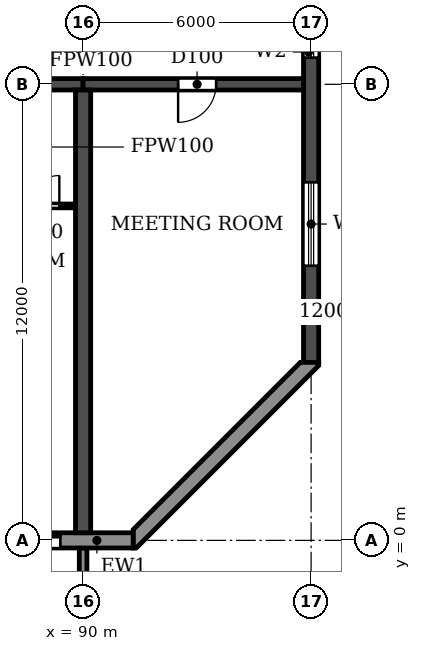
"""IFC4 building model, lengths in metres.
Left out: names, types, materials, properties, quantities, classifications, styles, units other than length and angle.
Written with IfcOpenShell. Run it as: python <this file> out.ifc"""

import sys

from ifc_helpers import new_model, si_unit, direction, frame, frame_2d, origin, place, context, subcontext, project, spatial, polyline, rectangle, outline, extrude, source, transform, mapped, element, fill, save


model = new_model("IFC4")
c1 = context("Model", 3, precision=1e-05, world=origin(), true_north=direction((0.0, 1.0)))
c2 = subcontext(c1, "Body", "Model", "MODEL_VIEW")
j1 = project(units=[si_unit("LENGTHUNIT", "METRE"), si_unit("PLANEANGLEUNIT", "RADIAN")], contexts=[c1])
p1 = place(None, origin())
s1 = spatial("IfcSite", under=j1, at=p1, CompositionType="ELEMENT")
p2 = place(p1, origin())
s2 = spatial("IfcBuilding", under=s1, at=p2, CompositionType="ELEMENT")
p3 = place(p2, frame((0.0, 0.0, 56.4)))
s3 = spatial("IfcBuildingStorey", under=s2, at=p3, CompositionType="ELEMENT", Elevation=56.4)
p4 = place(p3, frame((90.0, 0.2, 0.0), z_axis=(0.0, 0.0, 1.0), x_axis=(0.0, 1.0, 0.0)))
e1 = element("IfcWall", 1, at=p4, inside=s3, PredefinedType="SHEAR", context=c2, shape_type="SweptSolid", body=[
    extrude(rectangle(XDim=11.65, YDim=0.4, at=frame_2d((5.825, 0.0))), origin(), (0.0, 0.0, 1.0), 3.05),
])
p5 = place(p3, frame((96.0, 4.683, 0.0), z_axis=(0.0, 0.0, 1.0), x_axis=(0.0, 1.0, 0.0)))
e2 = element("IfcWall", 2, at=p5, inside=s3, PredefinedType="SHEAR", context=c2, shape_type="SweptSolid", body=[
    extrude(rectangle(XDim=35.434, YDim=0.4, at=frame_2d((17.717, 0.0))), origin(), (0.0, 0.0, 1.0), 3.05),
])
p6 = place(p5, frame((15.917, 0.0, 0.9)))
e3 = element("IfcOpeningElement", 3, at=p6, cuts=e2, PredefinedType="OPENING", context=c2, shape_type="SweptSolid", body=[
    extrude(rectangle(XDim=1.2, YDim=1.5, at=frame_2d((0.6, 0.75))), frame((0.0, 0.21, 0.0), z_axis=(0.0, -1.0, 0.0), x_axis=(1.0, 0.0, 0.0)), (0.0, 0.0, 1.0), 0.42),
])
p7 = place(p5, frame((23.817, 0.0, 0.9)))
e4 = element("IfcOpeningElement", 4, at=p7, cuts=e2, PredefinedType="OPENING", context=c2, shape_type="SweptSolid", body=[
    extrude(rectangle(XDim=1.2, YDim=1.5, at=frame_2d((0.6, 0.75))), frame((0.0, 0.21, 0.0), z_axis=(0.0, -1.0, 0.0), x_axis=(1.0, 0.0, 0.0)), (0.0, 0.0, 1.0), 0.42),
])
p8 = place(p5, frame((8.017, 0.0, 0.9)))
e5 = element("IfcOpeningElement", 5, at=p8, cuts=e2, PredefinedType="OPENING", context=c2, shape_type="SweptSolid", body=[
    extrude(rectangle(XDim=1.2, YDim=1.5, at=frame_2d((0.6, 0.75))), frame((0.0, 0.21, 0.0), z_axis=(0.0, -1.0, 0.0), x_axis=(1.0, 0.0, 0.0)), (0.0, 0.0, 1.0), 0.42),
])
p9 = place(p5, frame((29.493, 0.0, 0.6)))
e6 = element("IfcOpeningElement", 6, at=p9, cuts=e2, PredefinedType="OPENING", context=c2, shape_type="SweptSolid", body=[
    extrude(rectangle(XDim=2.2, YDim=1.8, at=frame_2d((1.1, 0.9))), frame((0.0, 0.21, 0.0), z_axis=(0.0, -1.0, 0.0), x_axis=(1.0, 0.0, 0.0)), (0.0, 0.0, 1.0), 0.42),
])
p10 = place(p5, frame((2.541, 0.0, 0.6)))
e7 = element("IfcOpeningElement", 7, at=p10, cuts=e2, PredefinedType="OPENING", context=c2, shape_type="SweptSolid", body=[
    extrude(rectangle(XDim=2.2, YDim=1.8, at=frame_2d((1.1, 0.9))), frame((0.0, 0.21, 0.0), z_axis=(0.0, -1.0, 0.0), x_axis=(1.0, 0.0, 0.0)), (0.0, 0.0, 1.0), 0.42),
])
p11 = place(p3, frame((84.0, 12.0, 0.0), z_axis=(0.0, 0.0, 1.0), x_axis=(1.0, 0.0, 0.0)))
e8 = element("IfcWall", 8, at=p11, inside=s3, PredefinedType="SHEAR", context=c2, shape_type="SweptSolid", body=[
    extrude(rectangle(XDim=6.0, YDim=0.3, at=frame_2d((3.0, 0.0))), origin(), (0.0, 0.0, 1.0), 2.45),
])
p12 = place(p11, frame((2.55, 0.0, 0.0)))
e9 = element("IfcOpeningElement", 9, at=p12, cuts=e8, PredefinedType="OPENING", context=c2, shape_type="SweptSolid", body=[
    extrude(rectangle(XDim=1.0, YDim=2.1, at=frame_2d((0.5, 1.05))), frame((0.0, 0.16, 0.0), z_axis=(0.0, -1.0, 0.0), x_axis=(1.0, 0.0, 0.0)), (0.0, 0.0, 1.0), 0.32),
])
p13 = place(p3, frame((90.0, 12.0, 0.0), z_axis=(0.0, 0.0, 1.0), x_axis=(1.0, 0.0, 0.0)))
e10 = element("IfcWall", 10, at=p13, inside=s3, PredefinedType="SHEAR", context=c2, shape_type="SweptSolid", body=[
    extrude(rectangle(XDim=5.8, YDim=0.3, at=frame_2d((2.9, 0.0))), origin(), (0.0, 0.0, 1.0), 2.45),
])
p14 = place(p13, frame((2.5, 0.0, 0.0)))
e11 = element("IfcOpeningElement", 11, at=p14, cuts=e10, PredefinedType="OPENING", context=c2, shape_type="SweptSolid", body=[
    extrude(rectangle(XDim=1.0, YDim=2.1, at=frame_2d((0.5, 1.05))), frame((0.0, 0.16, 0.0), z_axis=(0.0, -1.0, 0.0), x_axis=(1.0, 0.0, 0.0)), (0.0, 0.0, 1.0), 0.32),
])
p15 = place(p3, frame((10.683, 0.0, 0.0), z_axis=(0.0, 0.0, 1.0), x_axis=(1.0, 0.0, 0.0)))
e12 = element("IfcWall", 12, at=p15, inside=s3, PredefinedType="STANDARD", context=c2, shape_type="SweptSolid", body=[
    extrude(rectangle(XDim=80.634, YDim=0.4, at=frame_2d((40.317, 0.0))), origin(), (0.0, 0.0, 1.0), 3.05),
])
p16 = place(p15, frame((1.717, 0.0, 0.9)))
e13 = element("IfcOpeningElement", 13, at=p16, cuts=e12, PredefinedType="OPENING", context=c2, shape_type="SweptSolid", body=[
    extrude(rectangle(XDim=2.2, YDim=1.5, at=frame_2d((1.1, 0.75))), frame((0.0, 0.21, 0.0), z_axis=(0.0, -1.0, 0.0), x_axis=(1.0, 0.0, 0.0)), (0.0, 0.0, 1.0), 0.42),
])
p17 = place(p15, frame((4.917, 0.0, 0.0)))
e14 = element("IfcOpeningElement", 14, at=p17, cuts=e12, PredefinedType="OPENING", context=c2, shape_type="SweptSolid", body=[
    extrude(rectangle(XDim=1.8, YDim=2.4, at=frame_2d((0.9, 1.2))), frame((0.0, 0.21, 0.0), z_axis=(0.0, -1.0, 0.0), x_axis=(1.0, 0.0, 0.0)), (0.0, 0.0, 1.0), 0.42),
])
p18 = place(p15, frame((7.717, 0.0, 0.9)))
e15 = element("IfcOpeningElement", 15, at=p18, cuts=e12, PredefinedType="OPENING", context=c2, shape_type="SweptSolid", body=[
    extrude(rectangle(XDim=2.2, YDim=1.5, at=frame_2d((1.1, 0.75))), frame((0.0, 0.21, 0.0), z_axis=(0.0, -1.0, 0.0), x_axis=(1.0, 0.0, 0.0)), (0.0, 0.0, 1.0), 0.42),
])
p19 = place(p15, frame((10.717, 0.0, 0.9)))
e16 = element("IfcOpeningElement", 16, at=p19, cuts=e12, PredefinedType="OPENING", context=c2, shape_type="SweptSolid", body=[
    extrude(rectangle(XDim=2.2, YDim=1.5, at=frame_2d((1.1, 0.75))), frame((0.0, 0.21, 0.0), z_axis=(0.0, -1.0, 0.0), x_axis=(1.0, 0.0, 0.0)), (0.0, 0.0, 1.0), 0.42),
])
p20 = place(p15, frame((13.717, 0.0, 0.9)))
e17 = element("IfcOpeningElement", 17, at=p20, cuts=e12, PredefinedType="OPENING", context=c2, shape_type="SweptSolid", body=[
    extrude(rectangle(XDim=2.2, YDim=1.5, at=frame_2d((1.1, 0.75))), frame((0.0, 0.21, 0.0), z_axis=(0.0, -1.0, 0.0), x_axis=(1.0, 0.0, 0.0)), (0.0, 0.0, 1.0), 0.42),
])
p21 = place(p15, frame((16.917, 0.0, 0.0)))
e18 = element("IfcOpeningElement", 18, at=p21, cuts=e12, PredefinedType="OPENING", context=c2, shape_type="SweptSolid", body=[
    extrude(rectangle(XDim=1.8, YDim=2.4, at=frame_2d((0.9, 1.2))), frame((0.0, 0.21, 0.0), z_axis=(0.0, -1.0, 0.0), x_axis=(1.0, 0.0, 0.0)), (0.0, 0.0, 1.0), 0.42),
])
p22 = place(p15, frame((19.717, 0.0, 0.9)))
e19 = element("IfcOpeningElement", 19, at=p22, cuts=e12, PredefinedType="OPENING", context=c2, shape_type="SweptSolid", body=[
    extrude(rectangle(XDim=2.2, YDim=1.5, at=frame_2d((1.1, 0.75))), frame((0.0, 0.21, 0.0), z_axis=(0.0, -1.0, 0.0), x_axis=(1.0, 0.0, 0.0)), (0.0, 0.0, 1.0), 0.42),
])
p23 = place(p15, frame((22.717, 0.0, 0.9)))
e20 = element("IfcOpeningElement", 20, at=p23, cuts=e12, PredefinedType="OPENING", context=c2, shape_type="SweptSolid", body=[
    extrude(rectangle(XDim=2.2, YDim=1.5, at=frame_2d((1.1, 0.75))), frame((0.0, 0.21, 0.0), z_axis=(0.0, -1.0, 0.0), x_axis=(1.0, 0.0, 0.0)), (0.0, 0.0, 1.0), 0.42),
])
p24 = place(p15, frame((25.917, 0.0, 0.0)))
e21 = element("IfcOpeningElement", 21, at=p24, cuts=e12, PredefinedType="OPENING", context=c2, shape_type="SweptSolid", body=[
    extrude(rectangle(XDim=1.8, YDim=2.4, at=frame_2d((0.9, 1.2))), frame((0.0, 0.21, 0.0), z_axis=(0.0, -1.0, 0.0), x_axis=(1.0, 0.0, 0.0)), (0.0, 0.0, 1.0), 0.42),
])
p25 = place(p15, frame((28.717, 0.0, 0.9)))
e22 = element("IfcOpeningElement", 22, at=p25, cuts=e12, PredefinedType="OPENING", context=c2, shape_type="SweptSolid", body=[
    extrude(rectangle(XDim=2.2, YDim=1.5, at=frame_2d((1.1, 0.75))), frame((0.0, 0.21, 0.0), z_axis=(0.0, -1.0, 0.0), x_axis=(1.0, 0.0, 0.0)), (0.0, 0.0, 1.0), 0.42),
])
p26 = place(p15, frame((31.717, 0.0, 0.9)))
e23 = element("IfcOpeningElement", 23, at=p26, cuts=e12, PredefinedType="OPENING", context=c2, shape_type="SweptSolid", body=[
    extrude(rectangle(XDim=2.2, YDim=1.5, at=frame_2d((1.1, 0.75))), frame((0.0, 0.21, 0.0), z_axis=(0.0, -1.0, 0.0), x_axis=(1.0, 0.0, 0.0)), (0.0, 0.0, 1.0), 0.42),
])
p27 = place(p15, frame((34.717, 0.0, 0.9)))
e24 = element("IfcOpeningElement", 24, at=p27, cuts=e12, PredefinedType="OPENING", context=c2, shape_type="SweptSolid", body=[
    extrude(rectangle(XDim=2.2, YDim=1.5, at=frame_2d((1.1, 0.75))), frame((0.0, 0.21, 0.0), z_axis=(0.0, -1.0, 0.0), x_axis=(1.0, 0.0, 0.0)), (0.0, 0.0, 1.0), 0.42),
])
p28 = place(p15, frame((37.717, 0.0, 0.9)))
e25 = element("IfcOpeningElement", 25, at=p28, cuts=e12, PredefinedType="OPENING", context=c2, shape_type="SweptSolid", body=[
    extrude(rectangle(XDim=2.2, YDim=1.5, at=frame_2d((1.1, 0.75))), frame((0.0, 0.21, 0.0), z_axis=(0.0, -1.0, 0.0), x_axis=(1.0, 0.0, 0.0)), (0.0, 0.0, 1.0), 0.42),
])
p29 = place(p15, frame((40.917, 0.0, 0.0)))
e26 = element("IfcOpeningElement", 26, at=p29, cuts=e12, PredefinedType="OPENING", context=c2, shape_type="SweptSolid", body=[
    extrude(rectangle(XDim=1.8, YDim=2.4, at=frame_2d((0.9, 1.2))), frame((0.0, 0.21, 0.0), z_axis=(0.0, -1.0, 0.0), x_axis=(1.0, 0.0, 0.0)), (0.0, 0.0, 1.0), 0.42),
])
p30 = place(p15, frame((43.717, 0.0, 0.9)))
e27 = element("IfcOpeningElement", 27, at=p30, cuts=e12, PredefinedType="OPENING", context=c2, shape_type="SweptSolid", body=[
    extrude(rectangle(XDim=2.2, YDim=1.5, at=frame_2d((1.1, 0.75))), frame((0.0, 0.21, 0.0), z_axis=(0.0, -1.0, 0.0), x_axis=(1.0, 0.0, 0.0)), (0.0, 0.0, 1.0), 0.42),
])
p31 = place(p15, frame((46.717, 0.0, 0.9)))
e28 = element("IfcOpeningElement", 28, at=p31, cuts=e12, PredefinedType="OPENING", context=c2, shape_type="SweptSolid", body=[
    extrude(rectangle(XDim=2.2, YDim=1.5, at=frame_2d((1.1, 0.75))), frame((0.0, 0.21, 0.0), z_axis=(0.0, -1.0, 0.0), x_axis=(1.0, 0.0, 0.0)), (0.0, 0.0, 1.0), 0.42),
])
p32 = place(p15, frame((49.717, 0.0, 0.9)))
e29 = element("IfcOpeningElement", 29, at=p32, cuts=e12, PredefinedType="OPENING", context=c2, shape_type="SweptSolid", body=[
    extrude(rectangle(XDim=2.2, YDim=1.5, at=frame_2d((1.1, 0.75))), frame((0.0, 0.21, 0.0), z_axis=(0.0, -1.0, 0.0), x_axis=(1.0, 0.0, 0.0)), (0.0, 0.0, 1.0), 0.42),
])
p33 = place(p15, frame((52.717, 0.0, 0.9)))
e30 = element("IfcOpeningElement", 30, at=p33, cuts=e12, PredefinedType="OPENING", context=c2, shape_type="SweptSolid", body=[
    extrude(rectangle(XDim=2.2, YDim=1.5, at=frame_2d((1.1, 0.75))), frame((0.0, 0.21, 0.0), z_axis=(0.0, -1.0, 0.0), x_axis=(1.0, 0.0, 0.0)), (0.0, 0.0, 1.0), 0.42),
])
p34 = place(p15, frame((55.717, 0.0, 0.9)))
e31 = element("IfcOpeningElement", 31, at=p34, cuts=e12, PredefinedType="OPENING", context=c2, shape_type="SweptSolid", body=[
    extrude(rectangle(XDim=2.2, YDim=1.5, at=frame_2d((1.1, 0.75))), frame((0.0, 0.21, 0.0), z_axis=(0.0, -1.0, 0.0), x_axis=(1.0, 0.0, 0.0)), (0.0, 0.0, 1.0), 0.42),
])
p35 = place(p15, frame((58.717, 0.0, 0.9)))
e32 = element("IfcOpeningElement", 32, at=p35, cuts=e12, PredefinedType="OPENING", context=c2, shape_type="SweptSolid", body=[
    extrude(rectangle(XDim=2.2, YDim=1.5, at=frame_2d((1.1, 0.75))), frame((0.0, 0.21, 0.0), z_axis=(0.0, -1.0, 0.0), x_axis=(1.0, 0.0, 0.0)), (0.0, 0.0, 1.0), 0.42),
])
p36 = place(p15, frame((61.717, 0.0, 0.9)))
e33 = element("IfcOpeningElement", 33, at=p36, cuts=e12, PredefinedType="OPENING", context=c2, shape_type="SweptSolid", body=[
    extrude(rectangle(XDim=2.2, YDim=1.5, at=frame_2d((1.1, 0.75))), frame((0.0, 0.21, 0.0), z_axis=(0.0, -1.0, 0.0), x_axis=(1.0, 0.0, 0.0)), (0.0, 0.0, 1.0), 0.42),
])
p37 = place(p15, frame((64.917, 0.0, 0.0)))
e34 = element("IfcOpeningElement", 34, at=p37, cuts=e12, PredefinedType="OPENING", context=c2, shape_type="SweptSolid", body=[
    extrude(rectangle(XDim=1.8, YDim=2.4, at=frame_2d((0.9, 1.2))), frame((0.0, 0.21, 0.0), z_axis=(0.0, -1.0, 0.0), x_axis=(1.0, 0.0, 0.0)), (0.0, 0.0, 1.0), 0.42),
])
p38 = place(p15, frame((67.717, 0.0, 0.9)))
e35 = element("IfcOpeningElement", 35, at=p38, cuts=e12, PredefinedType="OPENING", context=c2, shape_type="SweptSolid", body=[
    extrude(rectangle(XDim=2.2, YDim=1.5, at=frame_2d((1.1, 0.75))), frame((0.0, 0.21, 0.0), z_axis=(0.0, -1.0, 0.0), x_axis=(1.0, 0.0, 0.0)), (0.0, 0.0, 1.0), 0.42),
])
p39 = place(p15, frame((70.717, 0.0, 0.9)))
e36 = element("IfcOpeningElement", 36, at=p39, cuts=e12, PredefinedType="OPENING", context=c2, shape_type="SweptSolid", body=[
    extrude(rectangle(XDim=2.2, YDim=1.5, at=frame_2d((1.1, 0.75))), frame((0.0, 0.21, 0.0), z_axis=(0.0, -1.0, 0.0), x_axis=(1.0, 0.0, 0.0)), (0.0, 0.0, 1.0), 0.42),
])
p40 = place(p15, frame((73.717, 0.0, 0.9)))
e37 = element("IfcOpeningElement", 37, at=p40, cuts=e12, PredefinedType="OPENING", context=c2, shape_type="SweptSolid", body=[
    extrude(rectangle(XDim=2.2, YDim=1.5, at=frame_2d((1.1, 0.75))), frame((0.0, 0.21, 0.0), z_axis=(0.0, -1.0, 0.0), x_axis=(1.0, 0.0, 0.0)), (0.0, 0.0, 1.0), 0.42),
])
p41 = place(p15, frame((76.917, 0.0, 0.0)))
e38 = element("IfcOpeningElement", 38, at=p41, cuts=e12, PredefinedType="OPENING", context=c2, shape_type="SweptSolid", body=[
    extrude(rectangle(XDim=1.8, YDim=2.4, at=frame_2d((0.9, 1.2))), frame((0.0, 0.21, 0.0), z_axis=(0.0, -1.0, 0.0), x_axis=(1.0, 0.0, 0.0)), (0.0, 0.0, 1.0), 0.42),
])
p42 = place(p3, origin())
e39 = element("IfcWall", 39, at=p42, inside=s3, PredefinedType="STANDARD", context=c2, shape_type="SweptSolid", body=[
    extrude(outline(polyline([(91.317, -0.2), (91.4, -0.2), (96.2, 4.6), (96.2, 4.683), (95.717, 4.683), (91.317, 0.283), (91.317, -0.2)])), origin(), (0.0, 0.0, 1.0), 3.05),
])
m1 = source(origin(), c2, "Body", "SweptSolid", [
    extrude(outline(polyline([(0.0, 0.0), (0.2, 0.0), (0.2, 1.65), (0.0, 1.65), (0.0, 0.0)])), origin(), (0.0, 0.0, 1.0), 3.1),
])
p43 = place(p3, frame((89.9, -1.85, 0.0)))
e40 = element("IfcWall", 40, at=p43, inside=s3, PredefinedType="STANDARD", context=c2, shape_type="MappedRepresentation", body=[
    mapped(m1, transform((0.0, 0.0, 0.0))),
])
p44 = place(p3, frame((87.9, 8.8, 0.0), z_axis=(0.0, 0.0, 1.0), x_axis=(1.0, 0.0, 0.0)))
e41 = element("IfcWall", 41, at=p44, inside=s3, PredefinedType="PARTITIONING", context=c2, shape_type="SweptSolid", body=[
    extrude(rectangle(XDim=1.89, YDim=0.1, at=frame_2d((0.945, 0.0))), origin(), (0.0, 0.0, 1.0), 3.05),
])
p45 = place(p44, frame((0.675, 0.0, 0.0)))
e42 = element("IfcOpeningElement", 42, at=p45, cuts=e41, PredefinedType="OPENING", context=c2, shape_type="SweptSolid", body=[
    extrude(rectangle(XDim=0.8, YDim=2.1, at=frame_2d((0.4, 1.05))), frame((0.0, 0.06, 0.0), z_axis=(0.0, -1.0, 0.0), x_axis=(1.0, 0.0, 0.0)), (0.0, 0.0, 1.0), 0.12),
])
p46 = place(p41, origin())
e43 = element("IfcDoor", 43, at=p46, inside=s3, OperationType="DOUBLE_DOOR_SLIDING", PredefinedType="DOOR", context=c2, shape_type="SweptSolid", body=[
    extrude(rectangle(XDim=1.8, YDim=2.4, at=frame_2d((0.9, 1.2))), frame((0.0, 0.025, 0.0), z_axis=(0.0, -1.0, 0.0), x_axis=(1.0, 0.0, 0.0)), (0.0, 0.0, 1.0), 0.05),
])
fill(e38, e43)
p47 = place(p8, origin())
e44 = element("IfcWindow", 44, at=p47, inside=s3, PartitioningType="SINGLE_PANEL", PredefinedType="WINDOW", context=c2, shape_type="SweptSolid", body=[
    extrude(rectangle(XDim=1.2, YDim=1.5, at=frame_2d((0.6, 0.75))), frame((0.0, 0.03, 0.0), z_axis=(0.0, -1.0, 0.0), x_axis=(1.0, 0.0, 0.0)), (0.0, 0.0, 1.0), 0.06),
])
fill(e5, e44)
p48 = place(p10, origin())
e45 = element("IfcWindow", 45, at=p48, inside=s3, PartitioningType="DOUBLE_PANEL_HORIZONTAL", PredefinedType="WINDOW", context=c2, shape_type="SweptSolid", body=[
    extrude(rectangle(XDim=2.2, YDim=1.8, at=frame_2d((1.1, 0.9))), frame((0.0, 0.03, 0.0), z_axis=(0.0, -1.0, 0.0), x_axis=(1.0, 0.0, 0.0)), (0.0, 0.0, 1.0), 0.06),
])
fill(e7, e45)
p49 = place(p45, origin())
e46 = element("IfcDoor", 46, at=p49, inside=s3, OperationType="SINGLE_SWING_RIGHT", PredefinedType="DOOR", context=c2, shape_type="SweptSolid", body=[
    extrude(rectangle(XDim=0.8, YDim=2.1, at=frame_2d((0.4, 1.05))), frame((0.0, 0.025, 0.0), z_axis=(0.0, -1.0, 0.0), x_axis=(1.0, 0.0, 0.0)), (0.0, 0.0, 1.0), 0.05),
])
fill(e42, e46)
p50 = place(p14, frame((1.0, 0.0, 0.0), z_axis=(0.0, 0.0, 1.0), x_axis=(-1.0, 0.0, 0.0)))
e47 = element("IfcDoor", 47, at=p50, inside=s3, OperationType="SINGLE_SWING_RIGHT", PredefinedType="DOOR", context=c2, shape_type="SweptSolid", body=[
    extrude(rectangle(XDim=1.0, YDim=2.1, at=frame_2d((0.5, 1.05))), frame((0.0, 0.025, 0.0), z_axis=(0.0, -1.0, 0.0), x_axis=(1.0, 0.0, 0.0)), (0.0, 0.0, 1.0), 0.05),
])
fill(e11, e47)
save(model, sys.argv[1])
